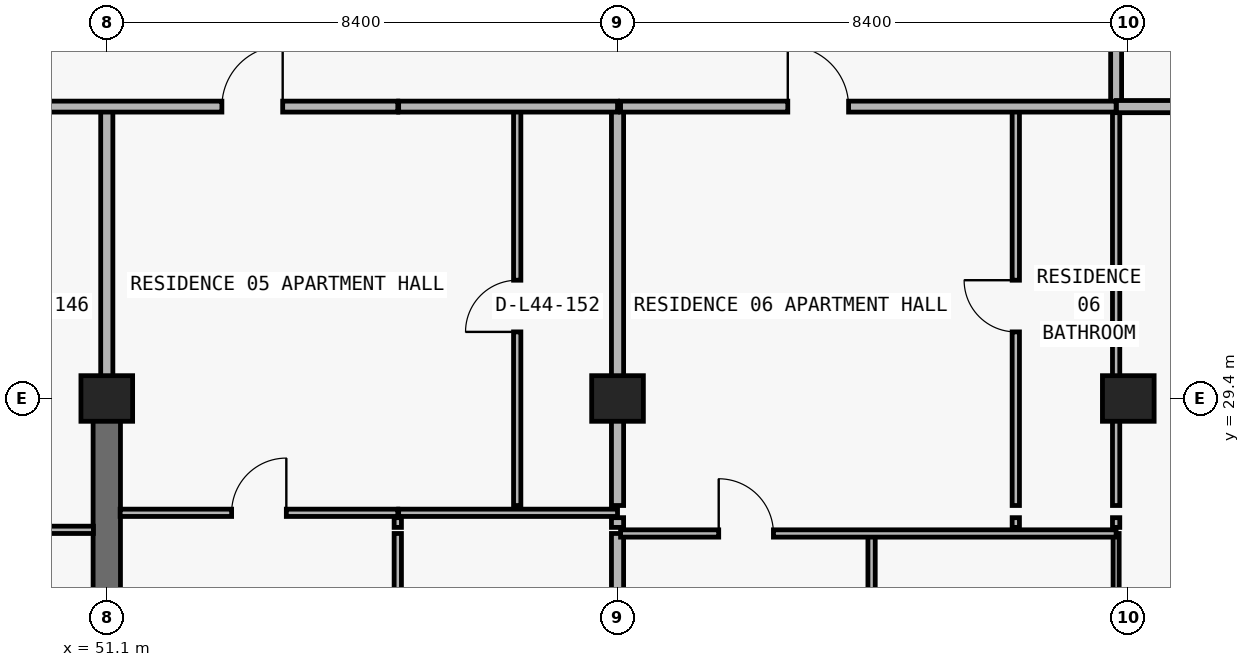
"""IFC4 building model, lengths in metres.
Left out: names, types, materials, properties, quantities, classifications, styles, units other than length and angle.
Written with IfcOpenShell. Run it as: python <this file> out.ifc"""

import sys

from ifc_helpers import new_model, si_unit, direction, frame, frame_2d, origin, origin_2d, place, context, subcontext, project, spatial, rectangle, extrude, element, fill, save


model = new_model("IFC4")
c1 = context("Model", 3, precision=1e-05, world=origin(), true_north=direction((0.0, 1.0)))
c2 = subcontext(c1, "Body", "Model", "MODEL_VIEW")
j1 = project(units=[si_unit("LENGTHUNIT", "METRE"), si_unit("PLANEANGLEUNIT", "RADIAN")], contexts=[c1])
p1 = place(None, origin())
s1 = spatial("IfcSite", under=j1, at=p1, CompositionType="ELEMENT")
p2 = place(p1, origin())
s2 = spatial("IfcBuilding", under=s1, at=p2, CompositionType="ELEMENT")
p3 = place(p2, frame((0.0, 0.0, 160.5)))
s3 = spatial("IfcBuildingStorey", under=s2, at=p3, CompositionType="ELEMENT", Elevation=160.5)
for number, where, z_axis, x_axis in (
    (1, (51.1, 29.4, 0.0), (0.0, 0.0, 1.0), (1.0, 0.0, 0.0)),
    (2, (59.5, 29.4, 0.0), (0.0, 0.0, 1.0), (1.0, 0.0, 0.0)),
    (3, (67.9, 29.4, 0.0), (0.0, 0.0, 1.0), (1.0, 0.0, 0.0)),
):
    element("IfcColumn", number, at=place(p3, frame(where, z_axis=z_axis, x_axis=x_axis)), inside=s3, PredefinedType="COLUMN", context=c2, shape_type="SweptSolid", body=[
        extrude(rectangle(XDim=0.85, YDim=0.75, at=origin_2d()), origin(), (0.0, 0.0, 1.0), 3.05),
    ])
p4 = place(p3, frame((51.1, 20.8, 0.0), z_axis=(0.0, 0.0, 1.0), x_axis=(0.0, 1.0, 0.0)))
e4 = element("IfcWall", 4, at=p4, inside=s3, PredefinedType="SHEAR", context=c2, shape_type="SweptSolid", body=[
    extrude(rectangle(XDim=8.6, YDim=0.45, at=frame_2d((4.3, 0.0))), origin(), (0.0, 0.0, 1.0), 3.05),
])
p5 = place(p3, frame((51.1, 29.405, 0.0), z_axis=(0.0, 0.0, 1.0), x_axis=(0.0, 1.0, 0.0)))
e5 = element("IfcWall", 5, at=p5, inside=s3, PredefinedType="PARTITIONING", context=c2, shape_type="SweptSolid", body=[
    extrude(rectangle(XDim=4.795, YDim=0.2, at=frame_2d((2.397, 0.0))), origin(), (0.0, 0.0, 1.0), 2.335),
])
p6 = place(p3, frame((55.886, 22.43, 0.0), z_axis=(0.0, 0.0, 1.0), x_axis=(0.0, 1.0, 0.0)))
e6 = element("IfcWall", 6, at=p6, inside=s3, PredefinedType="PARTITIONING", context=c2, shape_type="SweptSolid", body=[
    extrude(rectangle(XDim=4.75, YDim=0.12, at=frame_2d((2.375, 0.0))), origin(), (0.0, 0.0, 1.0), 3.05),
])
p7 = place(p6, frame((1.925, 0.0, 0.0)))
e7 = element("IfcOpeningElement", 7, at=p7, cuts=e6, PredefinedType="OPENING", context=c2, shape_type="SweptSolid", body=[
    extrude(rectangle(XDim=0.9, YDim=2.15, at=frame_2d((0.45, 1.075))), frame((0.0, 0.07, 0.0), z_axis=(0.0, -1.0, 0.0), x_axis=(1.0, 0.0, 0.0)), (0.0, 0.0, 1.0), 0.14),
])
p8 = place(p3, frame((55.886, 27.28, 0.0), z_axis=(0.0, 0.0, 1.0), x_axis=(0.0, 1.0, 0.0)))
e8 = element("IfcWall", 8, at=p8, inside=s3, PredefinedType="PARTITIONING", context=c2, shape_type="SweptSolid", body=[
    extrude(rectangle(XDim=0.16, YDim=0.12, at=frame_2d((0.08, 0.0))), origin(), (0.0, 0.0, 1.0), 3.05),
])
p9 = place(p3, frame((57.85, 27.64, 0.0), z_axis=(0.0, 0.0, 1.0), x_axis=(0.0, 1.0, 0.0)))
e9 = element("IfcWall", 9, at=p9, inside=s3, PredefinedType="PARTITIONING", context=c2, shape_type="SweptSolid", body=[
    extrude(rectangle(XDim=6.56, YDim=0.12, at=frame_2d((3.28, 0.0))), origin(), (0.0, 0.0, 1.0), 3.05),
])
p10 = place(p9, frame((2.855, 0.0, 0.0)))
e10 = element("IfcOpeningElement", 10, at=p10, cuts=e9, PredefinedType="OPENING", context=c2, shape_type="SweptSolid", body=[
    extrude(rectangle(XDim=0.85, YDim=2.1, at=frame_2d((0.425, 1.05))), frame((0.0, 0.07, 0.0), z_axis=(0.0, -1.0, 0.0), x_axis=(1.0, 0.0, 0.0)), (0.0, 0.0, 1.0), 0.14),
])
p11 = place(p3, frame((59.5, 22.43, 0.0), z_axis=(0.0, 0.0, 1.0), x_axis=(0.0, 1.0, 0.0)))
e11 = element("IfcWall", 11, at=p11, inside=s3, PredefinedType="PARTITIONING", context=c2, shape_type="SweptSolid", body=[
    extrude(rectangle(XDim=4.75, YDim=0.2, at=frame_2d((2.375, 0.0))), origin(), (0.0, 0.0, 1.0), 2.263),
])
p12 = place(p3, frame((59.5, 27.28, 0.0), z_axis=(0.0, 0.0, 1.0), x_axis=(0.0, 1.0, 0.0)))
e12 = element("IfcWall", 12, at=p12, inside=s3, PredefinedType="PARTITIONING", context=c2, shape_type="SweptSolid", body=[
    extrude(rectangle(XDim=0.16, YDim=0.2, at=frame_2d((0.08, 0.0))), origin(), (0.0, 0.0, 1.0), 2.263),
])
p13 = place(p3, frame((59.5, 27.64, 0.0), z_axis=(0.0, 0.0, 1.0), x_axis=(0.0, 1.0, 0.0)))
e13 = element("IfcWall", 13, at=p13, inside=s3, PredefinedType="PARTITIONING", context=c2, shape_type="SweptSolid", body=[
    extrude(rectangle(XDim=6.56, YDim=0.2, at=frame_2d((3.28, 0.0))), origin(), (0.0, 0.0, 1.0), 2.263),
])
p14 = place(p3, frame((63.678, 22.43, 0.0), z_axis=(0.0, 0.0, 1.0), x_axis=(0.0, 1.0, 0.0)))
e14 = element("IfcWall", 14, at=p14, inside=s3, PredefinedType="PARTITIONING", context=c2, shape_type="SweptSolid", body=[
    extrude(rectangle(XDim=4.75, YDim=0.12, at=frame_2d((2.375, 0.0))), origin(), (0.0, 0.0, 1.0), 3.05),
])
p15 = place(p14, frame((1.925, 0.0, 0.0)))
e15 = element("IfcOpeningElement", 15, at=p15, cuts=e14, PredefinedType="OPENING", context=c2, shape_type="SweptSolid", body=[
    extrude(rectangle(XDim=0.9, YDim=2.15, at=frame_2d((0.45, 1.075))), frame((0.0, 0.07, 0.0), z_axis=(0.0, -1.0, 0.0), x_axis=(1.0, 0.0, 0.0)), (0.0, 0.0, 1.0), 0.14),
])
p16 = place(p3, frame((66.05, 27.28, 0.0), z_axis=(0.0, 0.0, 1.0), x_axis=(0.0, 1.0, 0.0)))
e16 = element("IfcWall", 16, at=p16, inside=s3, PredefinedType="PARTITIONING", context=c2, shape_type="SweptSolid", body=[
    extrude(rectangle(XDim=0.16, YDim=0.12, at=frame_2d((0.08, 0.0))), origin(), (0.0, 0.0, 1.0), 3.05),
])
p17 = place(p3, frame((66.05, 27.64, 0.0), z_axis=(0.0, 0.0, 1.0), x_axis=(0.0, 1.0, 0.0)))
e17 = element("IfcWall", 17, at=p17, inside=s3, PredefinedType="PARTITIONING", context=c2, shape_type="SweptSolid", body=[
    extrude(rectangle(XDim=6.56, YDim=0.12, at=frame_2d((3.28, 0.0))), origin(), (0.0, 0.0, 1.0), 3.05),
])
p18 = place(p17, frame((2.855, 0.0, 0.0)))
e18 = element("IfcOpeningElement", 18, at=p18, cuts=e17, PredefinedType="OPENING", context=c2, shape_type="SweptSolid", body=[
    extrude(rectangle(XDim=0.85, YDim=2.1, at=frame_2d((0.425, 1.05))), frame((0.0, 0.07, 0.0), z_axis=(0.0, -1.0, 0.0), x_axis=(1.0, 0.0, 0.0)), (0.0, 0.0, 1.0), 0.14),
])
p19 = place(p3, frame((67.7, 22.43, 0.0), z_axis=(0.0, 0.0, 1.0), x_axis=(0.0, 1.0, 0.0)))
e19 = element("IfcWall", 19, at=p19, inside=s3, PredefinedType="MOVABLE", context=c2, shape_type="SweptSolid", body=[
    extrude(rectangle(XDim=4.75, YDim=0.1, at=frame_2d((2.375, 0.0))), origin(), (0.0, 0.0, 1.0), 2.263),
])
p20 = place(p19, frame((1.925, 0.0, 0.0)))
e20 = element("IfcOpeningElement", 20, at=p20, cuts=e19, PredefinedType="OPENING", context=c2, shape_type="SweptSolid", body=[
    extrude(rectangle(XDim=0.9, YDim=2.15, at=frame_2d((0.45, 1.075))), frame((0.0, 0.06, 0.0), z_axis=(0.0, -1.0, 0.0), x_axis=(1.0, 0.0, 0.0)), (0.0, 0.0, 1.0), 0.12),
])
p21 = place(p3, frame((67.7, 27.28, 0.0), z_axis=(0.0, 0.0, 1.0), x_axis=(0.0, 1.0, 0.0)))
e21 = element("IfcWall", 21, at=p21, inside=s3, PredefinedType="PARTITIONING", context=c2, shape_type="SweptSolid", body=[
    extrude(rectangle(XDim=0.16, YDim=0.12, at=frame_2d((0.08, 0.0))), origin(), (0.0, 0.0, 1.0), 2.263),
])
p22 = place(p3, frame((67.7, 27.64, 0.0), z_axis=(0.0, 0.0, 1.0), x_axis=(0.0, 1.0, 0.0)))
e22 = element("IfcWall", 22, at=p22, inside=s3, PredefinedType="PARTITIONING", context=c2, shape_type="SweptSolid", body=[
    extrude(rectangle(XDim=6.56, YDim=0.12, at=frame_2d((3.28, 0.0))), origin(), (0.0, 0.0, 1.0), 2.263),
])
p23 = place(p3, frame((67.7, 34.205, 0.0), z_axis=(0.0, 0.0, 1.0), x_axis=(0.0, 1.0, 0.0)))
e23 = element("IfcWall", 23, at=p23, inside=s3, PredefinedType="PARTITIONING", context=c2, shape_type="SweptSolid", body=[
    extrude(rectangle(XDim=2.745, YDim=0.18, at=frame_2d((1.373, 0.0))), origin(), (0.0, 0.0, 1.0), 2.263),
])
p24 = place(p3, frame((59.55, 27.18, 0.0), z_axis=(0.0, 0.0, 1.0), x_axis=(1.0, 0.0, 0.0)))
e24 = element("IfcWall", 24, at=p24, inside=s3, PredefinedType="PARTITIONING", context=c2, shape_type="SweptSolid", body=[
    extrude(rectangle(XDim=8.15, YDim=0.12, at=frame_2d((4.075, 0.0))), origin(), (0.0, 0.0, 1.0), 3.05),
])
p25 = place(p24, frame((1.614, 0.0, 0.0)))
e25 = element("IfcOpeningElement", 25, at=p25, cuts=e24, PredefinedType="OPENING", context=c2, shape_type="SweptSolid", body=[
    extrude(rectangle(XDim=0.9, YDim=2.15, at=frame_2d((0.45, 1.075))), frame((0.0, 0.07, 0.0), z_axis=(0.0, -1.0, 0.0), x_axis=(1.0, 0.0, 0.0)), (0.0, 0.0, 1.0), 0.14),
])
p26 = place(p3, frame((42.7, 27.24, 0.0), z_axis=(0.0, 0.0, 1.0), x_axis=(1.0, 0.0, 0.0)))
e26 = element("IfcWall", 26, at=p26, inside=s3, PredefinedType="PARTITIONING", context=c2, shape_type="SweptSolid", body=[
    extrude(rectangle(XDim=8.18, YDim=0.12, at=frame_2d((4.09, 0.0))), origin(), (0.0, 0.0, 1.0), 3.05),
])
p27 = place(p26, frame((1.818, 0.0, 0.0)))
e27 = element("IfcOpeningElement", 27, at=p27, cuts=e26, PredefinedType="OPENING", context=c2, shape_type="SweptSolid", body=[
    extrude(rectangle(XDim=0.9, YDim=2.15, at=frame_2d((0.45, 1.075))), frame((0.0, 0.07, 0.0), z_axis=(0.0, -1.0, 0.0), x_axis=(1.0, 0.0, 0.0)), (0.0, 0.0, 1.0), 0.14),
])
p28 = place(p3, frame((51.32, 27.52, 0.0), z_axis=(0.0, 0.0, 1.0), x_axis=(1.0, 0.0, 0.0)))
e28 = element("IfcWall", 28, at=p28, inside=s3, PredefinedType="PARTITIONING", context=c2, shape_type="SweptSolid", body=[
    extrude(rectangle(XDim=4.566, YDim=0.12, at=frame_2d((2.283, 0.0))), origin(), (0.0, 0.0, 1.0), 3.05),
])
p29 = place(p28, frame((1.833, 0.0, 0.0)))
e29 = element("IfcOpeningElement", 29, at=p29, cuts=e28, PredefinedType="OPENING", context=c2, shape_type="SweptSolid", body=[
    extrude(rectangle(XDim=0.9, YDim=2.15, at=frame_2d((0.45, 1.075))), frame((0.0, 0.07, 0.0), z_axis=(0.0, -1.0, 0.0), x_axis=(1.0, 0.0, 0.0)), (0.0, 0.0, 1.0), 0.14),
])
p30 = place(p3, frame((55.9, 27.52, 0.0), z_axis=(0.0, 0.0, 1.0), x_axis=(1.0, 0.0, 0.0)))
e30 = element("IfcWall", 30, at=p30, inside=s3, PredefinedType="PARTITIONING", context=c2, shape_type="SweptSolid", body=[
    extrude(rectangle(XDim=3.6, YDim=0.12, at=frame_2d((1.8, 0.0))), origin(), (0.0, 0.0, 1.0), 3.05),
])
p31 = place(p3, frame((18.3, 34.2, 0.0), z_axis=(0.0, 0.0, 1.0), x_axis=(1.0, 0.0, 0.0)))
e31 = element("IfcWall", 31, at=p31, inside=s3, PredefinedType="PARTITIONING", context=c2, shape_type="SweptSolid", body=[
    extrude(rectangle(XDim=37.586, YDim=0.18, at=frame_2d((18.793, 0.0))), origin(), (0.0, 0.0, 1.0), 3.05),
])
p32 = place(p31, frame((2.875, 0.0, 0.0)))
e32 = element("IfcOpeningElement", 32, at=p32, cuts=e31, PredefinedType="OPENING", context=c2, shape_type="SweptSolid", body=[
    extrude(rectangle(XDim=1.0, YDim=2.2, at=frame_2d((0.5, 1.1))), frame((0.0, 0.1, 0.0), z_axis=(0.0, -1.0, 0.0), x_axis=(1.0, 0.0, 0.0)), (0.0, 0.0, 1.0), 0.2),
])
p33 = place(p31, frame((11.315, 0.0, 0.0)))
e33 = element("IfcOpeningElement", 33, at=p33, cuts=e31, PredefinedType="OPENING", context=c2, shape_type="SweptSolid", body=[
    extrude(rectangle(XDim=1.0, YDim=2.2, at=frame_2d((0.5, 1.1))), frame((0.0, 0.1, 0.0), z_axis=(0.0, -1.0, 0.0), x_axis=(1.0, 0.0, 0.0)), (0.0, 0.0, 1.0), 0.2),
])
p34 = place(p31, frame((27.275, 0.0, 0.0)))
e34 = element("IfcOpeningElement", 34, at=p34, cuts=e31, PredefinedType="OPENING", context=c2, shape_type="SweptSolid", body=[
    extrude(rectangle(XDim=1.0, YDim=2.2, at=frame_2d((0.5, 1.1))), frame((0.0, 0.1, 0.0), z_axis=(0.0, -1.0, 0.0), x_axis=(1.0, 0.0, 0.0)), (0.0, 0.0, 1.0), 0.2),
])
p35 = place(p31, frame((34.693, 0.0, 0.0)))
e35 = element("IfcOpeningElement", 35, at=p35, cuts=e31, PredefinedType="OPENING", context=c2, shape_type="SweptSolid", body=[
    extrude(rectangle(XDim=1.0, YDim=2.2, at=frame_2d((0.5, 1.1))), frame((0.0, 0.1, 0.0), z_axis=(0.0, -1.0, 0.0), x_axis=(1.0, 0.0, 0.0)), (0.0, 0.0, 1.0), 0.2),
])
p36 = place(p3, frame((55.9, 34.2, 0.0), z_axis=(0.0, 0.0, 1.0), x_axis=(1.0, 0.0, 0.0)))
e36 = element("IfcWall", 36, at=p36, inside=s3, PredefinedType="PARTITIONING", context=c2, shape_type="SweptSolid", body=[
    extrude(rectangle(XDim=3.6, YDim=0.18, at=frame_2d((1.8, 0.0))), origin(), (0.0, 0.0, 1.0), 3.05),
])
p37 = place(p3, frame((59.55, 34.2, 0.0), z_axis=(0.0, 0.0, 1.0), x_axis=(1.0, 0.0, 0.0)))
e37 = element("IfcWall", 37, at=p37, inside=s3, PredefinedType="PARTITIONING", context=c2, shape_type="SweptSolid", body=[
    extrude(rectangle(XDim=8.15, YDim=0.18, at=frame_2d((4.075, 0.0))), origin(), (0.0, 0.0, 1.0), 3.05),
])
p38 = place(p37, frame((2.75, 0.0, 0.0)))
e38 = element("IfcOpeningElement", 38, at=p38, cuts=e37, PredefinedType="OPENING", context=c2, shape_type="SweptSolid", body=[
    extrude(rectangle(XDim=1.0, YDim=2.2, at=frame_2d((0.5, 1.1))), frame((0.0, 0.1, 0.0), z_axis=(0.0, -1.0, 0.0), x_axis=(1.0, 0.0, 0.0)), (0.0, 0.0, 1.0), 0.2),
])
p39 = place(p3, frame((67.705, 34.2, 0.0), z_axis=(0.0, 0.0, 1.0), x_axis=(1.0, 0.0, 0.0)))
e39 = element("IfcWall", 39, at=p39, inside=s3, PredefinedType="PARTITIONING", context=c2, shape_type="SweptSolid", body=[
    extrude(rectangle(XDim=3.7, YDim=0.2, at=frame_2d((1.85, 0.0))), origin(), (0.0, 0.0, 1.0), 3.05),
])
p40 = place(p35, origin())
e40 = element("IfcDoor", 40, at=p40, inside=s3, OperationType="SINGLE_SWING_RIGHT", PredefinedType="DOOR", context=c2, shape_type="SweptSolid", body=[
    extrude(rectangle(XDim=1.0, YDim=2.2, at=frame_2d((0.5, 1.1))), frame((0.0, 0.025, 0.0), z_axis=(0.0, -1.0, 0.0), x_axis=(1.0, 0.0, 0.0)), (0.0, 0.0, 1.0), 0.05),
])
fill(e35, e40)
p41 = place(p10, origin())
e41 = element("IfcDoor", 41, at=p41, inside=s3, OperationType="SINGLE_SWING_LEFT", PredefinedType="DOOR", context=c2, shape_type="SweptSolid", body=[
    extrude(rectangle(XDim=0.85, YDim=2.1, at=frame_2d((0.425, 1.05))), frame((0.0, 0.025, 0.0), z_axis=(0.0, -1.0, 0.0), x_axis=(1.0, 0.0, 0.0)), (0.0, 0.0, 1.0), 0.05),
])
fill(e10, e41)
p42 = place(p29, origin())
e42 = element("IfcDoor", 42, at=p42, inside=s3, OperationType="SINGLE_SWING_RIGHT", PredefinedType="DOOR", context=c2, shape_type="SweptSolid", body=[
    extrude(rectangle(XDim=0.9, YDim=2.15, at=frame_2d((0.45, 1.075))), frame((0.0, 0.025, 0.0), z_axis=(0.0, -1.0, 0.0), x_axis=(1.0, 0.0, 0.0)), (0.0, 0.0, 1.0), 0.05),
])
fill(e29, e42)
p43 = place(p38, origin())
e43 = element("IfcDoor", 43, at=p43, inside=s3, OperationType="SINGLE_SWING_LEFT", PredefinedType="DOOR", context=c2, shape_type="SweptSolid", body=[
    extrude(rectangle(XDim=1.0, YDim=2.2, at=frame_2d((0.5, 1.1))), frame((0.0, 0.025, 0.0), z_axis=(0.0, -1.0, 0.0), x_axis=(1.0, 0.0, 0.0)), (0.0, 0.0, 1.0), 0.05),
])
fill(e38, e43)
p44 = place(p18, origin())
e44 = element("IfcDoor", 44, at=p44, inside=s3, OperationType="SINGLE_SWING_RIGHT", PredefinedType="DOOR", context=c2, shape_type="SweptSolid", body=[
    extrude(rectangle(XDim=0.85, YDim=2.1, at=frame_2d((0.425, 1.05))), frame((0.0, 0.025, 0.0), z_axis=(0.0, -1.0, 0.0), x_axis=(1.0, 0.0, 0.0)), (0.0, 0.0, 1.0), 0.05),
])
fill(e18, e44)
p45 = place(p25, origin())
e45 = element("IfcDoor", 45, at=p45, inside=s3, OperationType="SINGLE_SWING_LEFT", PredefinedType="DOOR", context=c2, shape_type="SweptSolid", body=[
    extrude(rectangle(XDim=0.9, YDim=2.15, at=frame_2d((0.45, 1.075))), frame((0.0, 0.025, 0.0), z_axis=(0.0, -1.0, 0.0), x_axis=(1.0, 0.0, 0.0)), (0.0, 0.0, 1.0), 0.05),
])
fill(e25, e45)
save(model, sys.argv[1])
